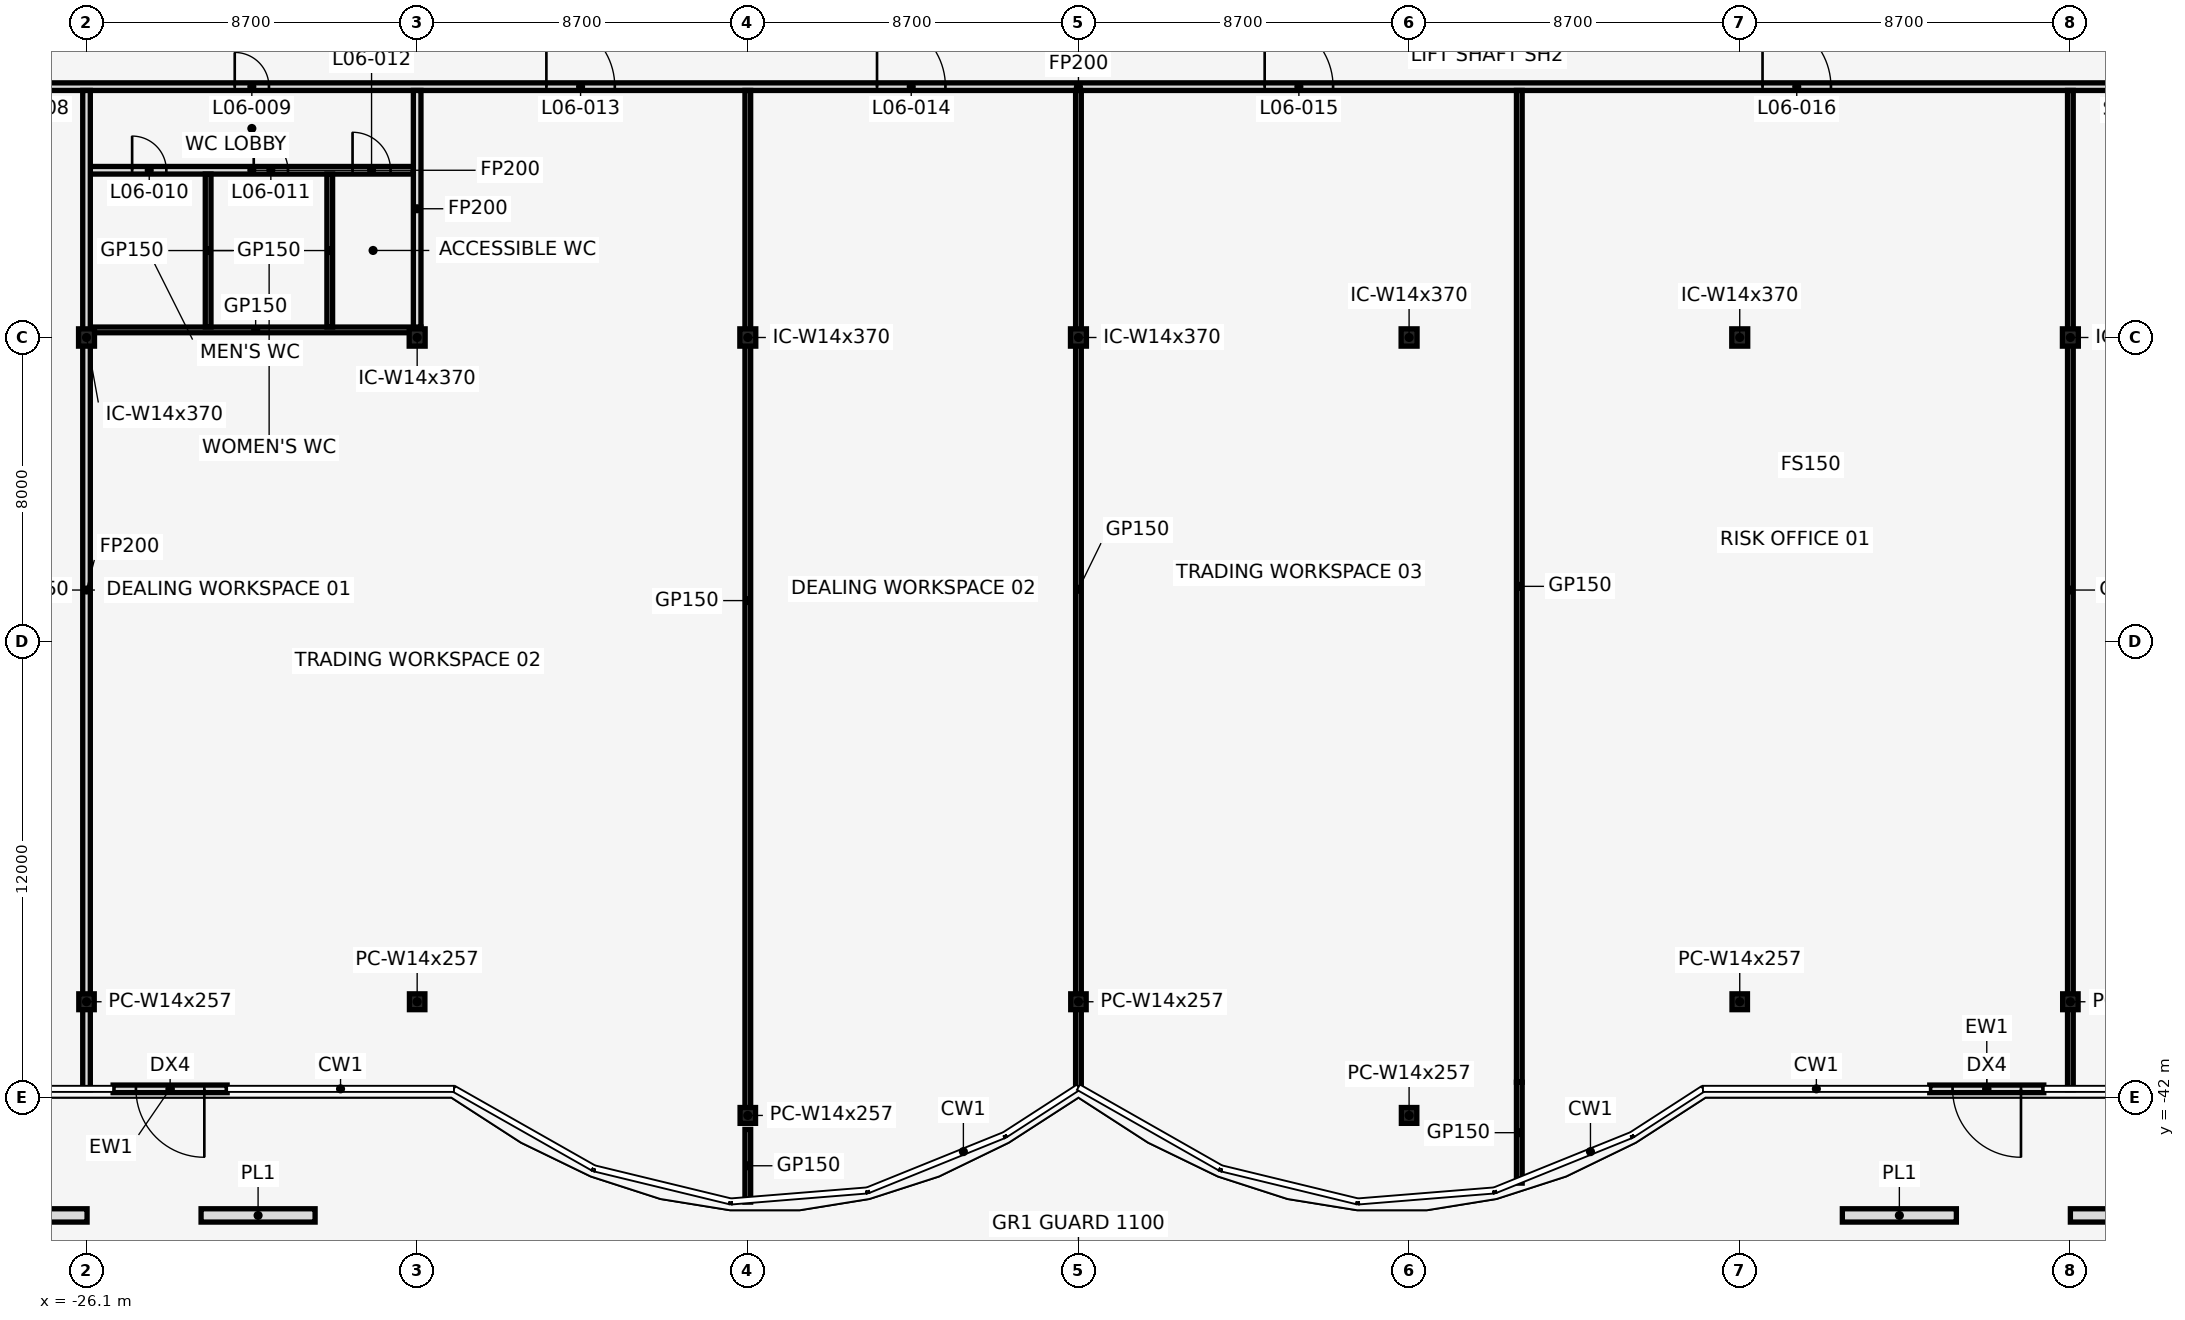
"""IFC4 building model, lengths in metres.
Left out: names, types, materials, properties, quantities, classifications, styles, units other than length and angle.
Written with IfcOpenShell. Run it as: python <this file> out.ifc"""

import sys

from ifc_helpers import new_model, si_unit, direction, frame, frame_2d, origin, origin_2d, place, context, subcontext, project, spatial, rectangle, i_section, extrude, element, fill, save


model = new_model("IFC4")
c1 = context("Model", 3, precision=1e-05, world=origin(), true_north=direction((0.0, 1.0)))
c2 = subcontext(c1, "Body", "Model", "MODEL_VIEW")
j1 = project(units=[si_unit("LENGTHUNIT", "METRE"), si_unit("PLANEANGLEUNIT", "RADIAN")], contexts=[c1])
p1 = place(None, origin())
s1 = spatial("IfcSite", under=j1, at=p1, CompositionType="ELEMENT")
p2 = place(p1, origin())
s2 = spatial("IfcBuilding", under=s1, at=p2, CompositionType="ELEMENT")
p3 = place(p2, frame((0.0, 0.0, 35.0)))
s3 = spatial("IfcBuildingStorey", under=s2, at=p3, CompositionType="ELEMENT", Elevation=35.0)
for number, where, z_axis, x_axis in (
    (1, (-26.1, -39.478, 0.0), (0.0, 0.0, 1.0), (1.0, 0.0, 0.0)),
    (2, (-17.4, -39.478, 0.0), (0.0, 0.0, 1.0), (1.0, 0.0, 0.0)),
    (3, (-8.7, -42.469, 0.0), (0.0, 0.0, 1.0), (1.0, 0.0, 0.0)),
    (4, (0.0, -39.478, 0.0), (0.0, 0.0, 1.0), (1.0, 0.0, 0.0)),
    (5, (8.7, -42.469, 0.0), (0.0, 0.0, 1.0), (1.0, 0.0, 0.0)),
    (6, (17.4, -39.478, 0.0), (0.0, 0.0, 1.0), (1.0, 0.0, 0.0)),
    (7, (26.1, -39.478, 0.0), (0.0, 0.0, 1.0), (1.0, 0.0, 0.0)),
):
    element("IfcColumn", number, at=place(p3, frame(where, z_axis=z_axis, x_axis=x_axis)), inside=s3, PredefinedType="COLUMN", context=c2, shape_type="SweptSolid", body=[
        extrude(i_section(OverallWidth=0.406, OverallDepth=0.417, WebThickness=0.03, FlangeThickness=0.048, at=origin_2d()), origin(), (0.0, 0.0, 1.0), 4.5),
    ])
for number, where, z_axis, x_axis in (
    (8, (-26.1, -22.0, 0.0), (0.0, 0.0, 1.0), (1.0, 0.0, 0.0)),
    (9, (-17.4, -22.0, 0.0), (0.0, 0.0, 1.0), (1.0, 0.0, 0.0)),
    (10, (-8.7, -22.0, 0.0), (0.0, 0.0, 1.0), (1.0, 0.0, 0.0)),
    (11, (0.0, -22.0, 0.0), (0.0, 0.0, 1.0), (1.0, 0.0, 0.0)),
    (12, (8.7, -22.0, 0.0), (0.0, 0.0, 1.0), (1.0, 0.0, 0.0)),
    (13, (17.4, -22.0, 0.0), (0.0, 0.0, 1.0), (1.0, 0.0, 0.0)),
    (14, (26.1, -22.0, 0.0), (0.0, 0.0, 1.0), (1.0, 0.0, 0.0)),
):
    element("IfcColumn", number, at=place(p3, frame(where, z_axis=z_axis, x_axis=x_axis)), inside=s3, PredefinedType="COLUMN", context=c2, shape_type="SweptSolid", body=[
        extrude(i_section(OverallWidth=0.419, OverallDepth=0.455, WebThickness=0.042, FlangeThickness=0.068, at=origin_2d()), origin(), (0.0, 0.0, 1.0), 4.5),
    ])
p4 = place(p3, frame((-22.4, -41.77, 0.0), z_axis=(0.0, 0.0, 1.0), x_axis=(-1.0, 0.0, 0.0)))
e15 = element("IfcWall", 15, at=p4, inside=s3, PredefinedType="STANDARD", context=c2, shape_type="SweptSolid", body=[
    extrude(rectangle(XDim=3.0, YDim=0.2, at=frame_2d((1.5, 0.0))), origin(), (0.0, 0.0, 1.0), 4.35),
])
p5 = place(p4, frame((0.6, 0.0, 0.0)))
e16 = element("IfcOpeningElement", 16, at=p5, cuts=e15, PredefinedType="OPENING", context=c2, shape_type="SweptSolid", body=[
    extrude(rectangle(XDim=1.8, YDim=2.4, at=frame_2d((0.9, 1.2))), frame((0.0, 0.112, 0.0), z_axis=(0.0, -1.0, 0.0), x_axis=(1.0, 0.0, 0.0)), (0.0, 0.0, 1.0), 0.224),
])
p6 = place(p3, frame((25.4, -41.77, 0.0), z_axis=(0.0, 0.0, 1.0), x_axis=(-1.0, 0.0, 0.0)))
e17 = element("IfcWall", 17, at=p6, inside=s3, PredefinedType="STANDARD", context=c2, shape_type="SweptSolid", body=[
    extrude(rectangle(XDim=3.0, YDim=0.2, at=frame_2d((1.5, 0.0))), origin(), (0.0, 0.0, 1.0), 4.35),
])
p7 = place(p6, frame((0.6, 0.0, 0.0)))
e18 = element("IfcOpeningElement", 18, at=p7, cuts=e17, PredefinedType="OPENING", context=c2, shape_type="SweptSolid", body=[
    extrude(rectangle(XDim=1.8, YDim=2.4, at=frame_2d((0.9, 1.2))), frame((0.0, 0.112, 0.0), z_axis=(0.0, -1.0, 0.0), x_axis=(1.0, 0.0, 0.0)), (0.0, 0.0, 1.0), 0.224),
])
for number, where, z_axis, x_axis in (
    (19, (-20.086, -45.1, 0.0), (0.0, 0.0, 1.0), (-1.0, 0.0, 0.0)),
    (20, (-26.086, -45.1, 0.0), (0.0, 0.0, 1.0), (-1.0, 0.0, 0.0)),
    (21, (29.1, -45.1, 0.0), (0.0, 0.0, 1.0), (-1.0, 0.0, 0.0)),
    (22, (23.1, -45.1, 0.0), (0.0, 0.0, 1.0), (-1.0, 0.0, 0.0)),
):
    element("IfcWall", number, at=place(p3, frame(where, z_axis=z_axis, x_axis=x_axis)), inside=s3, PredefinedType="USERDEFINED", context=c2, shape_type="SweptSolid", body=[
        extrude(rectangle(XDim=3.0, YDim=0.35, at=frame_2d((1.5, 0.0))), origin(), (0.0, 0.0, 1.0), 0.6),
    ])
p8 = place(p3, frame((-26.0, -21.8, 0.0), z_axis=(0.0, 0.0, 1.0), x_axis=(1.0, 0.0, 0.0)))
e23 = element("IfcWall", 23, at=p8, inside=s3, PredefinedType="PARTITIONING", context=c2, shape_type="SweptSolid", body=[
    extrude(rectangle(XDim=8.7, YDim=0.15, at=frame_2d((4.35, 0.0))), origin(), (0.0, 0.0, 1.0), 3.36),
])
p9 = place(p3, frame((-26.0, -17.6, 0.0), z_axis=(0.0, 0.0, 1.0), x_axis=(1.0, 0.0, 0.0)))
e24 = element("IfcWall", 24, at=p9, inside=s3, PredefinedType="PARTITIONING", context=c2, shape_type="SweptSolid", body=[
    extrude(rectangle(XDim=8.5, YDim=0.2, at=frame_2d((4.25, 0.0))), origin(), (0.0, 0.0, 1.0), 3.36),
])
p10 = place(p9, frame((1.1, 0.0, 0.0)))
e25 = element("IfcOpeningElement", 25, at=p10, cuts=e24, PredefinedType="OPENING", context=c2, shape_type="SweptSolid", body=[
    extrude(rectangle(XDim=0.9, YDim=2.1, at=frame_2d((0.45, 1.05))), frame((0.0, 0.112, 0.0), z_axis=(0.0, -1.0, 0.0), x_axis=(1.0, 0.0, 0.0)), (0.0, 0.0, 1.0), 0.224),
])
p11 = place(p9, frame((4.3, 0.0, 0.0)))
e26 = element("IfcOpeningElement", 26, at=p11, cuts=e24, PredefinedType="OPENING", context=c2, shape_type="SweptSolid", body=[
    extrude(rectangle(XDim=0.9, YDim=2.1, at=frame_2d((0.45, 1.05))), frame((0.0, 0.112, 0.0), z_axis=(0.0, -1.0, 0.0), x_axis=(1.0, 0.0, 0.0)), (0.0, 0.0, 1.0), 0.224),
])
p12 = place(p9, frame((6.9, 0.0, 0.0)))
e27 = element("IfcOpeningElement", 27, at=p12, cuts=e24, PredefinedType="OPENING", context=c2, shape_type="SweptSolid", body=[
    extrude(rectangle(XDim=1.0, YDim=2.1, at=frame_2d((0.5, 1.05))), frame((0.0, 0.112, 0.0), z_axis=(0.0, -1.0, 0.0), x_axis=(1.0, 0.0, 0.0)), (0.0, 0.0, 1.0), 0.224),
])
p13 = place(p3, frame((-35.68, -15.4, 0.0), z_axis=(0.0, 0.0, 1.0), x_axis=(1.0, 0.0, 0.0)))
e28 = element("IfcWall", 28, at=p13, inside=s3, PredefinedType="PARTITIONING", context=c2, shape_type="SweptSolid", body=[
    extrude(rectangle(XDim=71.36, YDim=0.2, at=frame_2d((35.68, 0.0))), origin(), (0.0, 0.0, 1.0), 3.36),
])
p14 = place(p13, frame((3.3, 0.0, 0.0)))
e29 = element("IfcOpeningElement", 29, at=p14, cuts=e28, PredefinedType="OPENING", context=c2, shape_type="SweptSolid", body=[
    extrude(rectangle(XDim=1.8, YDim=2.1, at=frame_2d((0.9, 1.05))), frame((0.0, 0.112, 0.0), z_axis=(0.0, -1.0, 0.0), x_axis=(1.0, 0.0, 0.0)), (0.0, 0.0, 1.0), 0.224),
])
p15 = place(p13, frame((7.58, 0.0, 0.0)))
e30 = element("IfcOpeningElement", 30, at=p15, cuts=e28, PredefinedType="OPENING", context=c2, shape_type="SweptSolid", body=[
    extrude(rectangle(XDim=1.0, YDim=2.1, at=frame_2d((0.5, 1.05))), frame((0.0, 0.112, 0.0), z_axis=(0.0, -1.0, 0.0), x_axis=(1.0, 0.0, 0.0)), (0.0, 0.0, 1.0), 0.224),
])
p16 = place(p13, frame((13.48, 0.0, 0.0)))
e31 = element("IfcOpeningElement", 31, at=p16, cuts=e28, PredefinedType="OPENING", context=c2, shape_type="SweptSolid", body=[
    extrude(rectangle(XDim=0.9, YDim=2.1, at=frame_2d((0.45, 1.05))), frame((0.0, 0.112, 0.0), z_axis=(0.0, -1.0, 0.0), x_axis=(1.0, 0.0, 0.0)), (0.0, 0.0, 1.0), 0.224),
])
p17 = place(p13, frame((21.68, 0.0, 0.0)))
e32 = element("IfcOpeningElement", 32, at=p17, cuts=e28, PredefinedType="OPENING", context=c2, shape_type="SweptSolid", body=[
    extrude(rectangle(XDim=1.8, YDim=2.1, at=frame_2d((0.9, 1.05))), frame((0.0, 0.112, 0.0), z_axis=(0.0, -1.0, 0.0), x_axis=(1.0, 0.0, 0.0)), (0.0, 0.0, 1.0), 0.224),
])
p18 = place(p13, frame((30.38, 0.0, 0.0)))
e33 = element("IfcOpeningElement", 33, at=p18, cuts=e28, PredefinedType="OPENING", context=c2, shape_type="SweptSolid", body=[
    extrude(rectangle(XDim=1.8, YDim=2.1, at=frame_2d((0.9, 1.05))), frame((0.0, 0.112, 0.0), z_axis=(0.0, -1.0, 0.0), x_axis=(1.0, 0.0, 0.0)), (0.0, 0.0, 1.0), 0.224),
])
p19 = place(p13, frame((40.58, 0.0, 0.0)))
e34 = element("IfcOpeningElement", 34, at=p19, cuts=e28, PredefinedType="OPENING", context=c2, shape_type="SweptSolid", body=[
    extrude(rectangle(XDim=1.8, YDim=2.1, at=frame_2d((0.9, 1.05))), frame((0.0, 0.112, 0.0), z_axis=(0.0, -1.0, 0.0), x_axis=(1.0, 0.0, 0.0)), (0.0, 0.0, 1.0), 0.224),
])
p20 = place(p13, frame((53.68, 0.0, 0.0)))
e35 = element("IfcOpeningElement", 35, at=p20, cuts=e28, PredefinedType="OPENING", context=c2, shape_type="SweptSolid", body=[
    extrude(rectangle(XDim=1.8, YDim=2.1, at=frame_2d((0.9, 1.05))), frame((0.0, 0.112, 0.0), z_axis=(0.0, -1.0, 0.0), x_axis=(1.0, 0.0, 0.0)), (0.0, 0.0, 1.0), 0.224),
])
p21 = place(p13, frame((65.68, 0.0, 0.0)))
e36 = element("IfcOpeningElement", 36, at=p21, cuts=e28, PredefinedType="OPENING", context=c2, shape_type="SweptSolid", body=[
    extrude(rectangle(XDim=1.8, YDim=2.1, at=frame_2d((0.9, 1.05))), frame((0.0, 0.112, 0.0), z_axis=(0.0, -1.0, 0.0), x_axis=(1.0, 0.0, 0.0)), (0.0, 0.0, 1.0), 0.224),
])
p22 = place(p3, frame((-26.1, -41.79, 0.0), z_axis=(0.0, 0.0, 1.0), x_axis=(0.0, 1.0, 0.0)))
e37 = element("IfcWall", 37, at=p22, inside=s3, PredefinedType="PARTITIONING", context=c2, shape_type="SweptSolid", body=[
    extrude(rectangle(XDim=26.29, YDim=0.2, at=frame_2d((13.145, 0.0))), origin(), (0.0, 0.0, 1.0), 3.36),
])
for number, where, z_axis, x_axis in (
    (38, (-22.9, -21.725, 0.0), (0.0, 0.0, 1.0), (0.0, 1.0, 0.0)),
    (39, (-19.7, -21.725, 0.0), (0.0, 0.0, 1.0), (0.0, 1.0, 0.0)),
):
    element("IfcWall", number, at=place(p3, frame(where, z_axis=z_axis, x_axis=x_axis)), inside=s3, PredefinedType="PARTITIONING", context=c2, shape_type="SweptSolid", body=[
        extrude(rectangle(XDim=4.025, YDim=0.15, at=frame_2d((2.013, 0.0))), origin(), (0.0, 0.0, 1.0), 3.36),
    ])
p23 = place(p3, frame((-17.4, -21.725, 0.0), z_axis=(0.0, 0.0, 1.0), x_axis=(0.0, 1.0, 0.0)))
e40 = element("IfcWall", 40, at=p23, inside=s3, PredefinedType="PARTITIONING", context=c2, shape_type="SweptSolid", body=[
    extrude(rectangle(XDim=6.225, YDim=0.2, at=frame_2d((3.113, 0.0))), origin(), (0.0, 0.0, 1.0), 3.36),
])
p24 = place(p3, frame((-8.7, -44.75, 0.0), z_axis=(0.0, 0.0, 1.0), x_axis=(0.0, 1.0, 0.0)))
e41 = element("IfcWall", 41, at=p24, inside=s3, PredefinedType="PARTITIONING", context=c2, shape_type="SweptSolid", body=[
    extrude(rectangle(XDim=1.913, YDim=0.15, at=frame_2d((0.957, 0.0))), origin(), (0.0, 0.0, 1.0), 3.36),
])
p25 = place(p3, frame((-8.7, -42.345, 0.0), z_axis=(0.0, 0.0, 1.0), x_axis=(0.0, 1.0, 0.0)))
e42 = element("IfcWall", 42, at=p25, inside=s3, PredefinedType="PARTITIONING", context=c2, shape_type="SweptSolid", body=[
    extrude(rectangle(XDim=26.845, YDim=0.15, at=frame_2d((13.423, 0.0))), origin(), (0.0, 0.0, 1.0), 3.36),
])
p26 = place(p3, frame((0.0, -41.75, 0.0), z_axis=(0.0, 0.0, 1.0), x_axis=(0.0, 1.0, 0.0)))
e43 = element("IfcWall", 43, at=p26, inside=s3, PredefinedType="PARTITIONING", context=c2, shape_type="SweptSolid", body=[
    extrude(rectangle(XDim=26.25, YDim=0.15, at=frame_2d((13.125, 0.0))), origin(), (0.0, 0.0, 1.0), 3.36),
])
p27 = place(p3, frame((11.6, -44.25, 0.0), z_axis=(0.0, 0.0, 1.0), x_axis=(0.0, 1.0, 0.0)))
e44 = element("IfcWall", 44, at=p27, inside=s3, PredefinedType="PARTITIONING", context=c2, shape_type="SweptSolid", body=[
    extrude(rectangle(XDim=2.654, YDim=0.15, at=frame_2d((1.327, 0.0))), origin(), (0.0, 0.0, 1.0), 3.36),
])
p28 = place(p3, frame((11.6, -41.596, 0.0), z_axis=(0.0, 0.0, 1.0), x_axis=(0.0, 1.0, 0.0)))
e45 = element("IfcWall", 45, at=p28, inside=s3, PredefinedType="PARTITIONING", context=c2, shape_type="SweptSolid", body=[
    extrude(rectangle(XDim=26.096, YDim=0.15, at=frame_2d((13.048, 0.0))), origin(), (0.0, 0.0, 1.0), 3.36),
])
p29 = place(p3, frame((26.1, -41.79, 0.0), z_axis=(0.0, 0.0, 1.0), x_axis=(0.0, 1.0, 0.0)))
e46 = element("IfcWall", 46, at=p29, inside=s3, PredefinedType="PARTITIONING", context=c2, shape_type="SweptSolid", body=[
    extrude(rectangle(XDim=26.29, YDim=0.15, at=frame_2d((13.145, 0.0))), origin(), (0.0, 0.0, 1.0), 3.36),
])
p30 = place(p5, origin())
e47 = element("IfcDoor", 47, at=p30, inside=s3, OperationType="SINGLE_SWING_LEFT", PredefinedType="DOOR", context=c2, shape_type="SweptSolid", body=[
    extrude(rectangle(XDim=1.8, YDim=2.4, at=frame_2d((0.9, 1.2))), frame((0.0, 0.025, 0.0), z_axis=(0.0, -1.0, 0.0), x_axis=(1.0, 0.0, 0.0)), (0.0, 0.0, 1.0), 0.05),
])
fill(e16, e47)
p31 = place(p7, origin())
e48 = element("IfcDoor", 48, at=p31, inside=s3, OperationType="SINGLE_SWING_LEFT", PredefinedType="DOOR", context=c2, shape_type="SweptSolid", body=[
    extrude(rectangle(XDim=1.8, YDim=2.4, at=frame_2d((0.9, 1.2))), frame((0.0, 0.025, 0.0), z_axis=(0.0, -1.0, 0.0), x_axis=(1.0, 0.0, 0.0)), (0.0, 0.0, 1.0), 0.05),
])
fill(e18, e48)
p32 = place(p16, frame((0.9, 0.0, 0.0), z_axis=(0.0, 0.0, 1.0), x_axis=(-1.0, 0.0, 0.0)))
e49 = element("IfcDoor", 49, at=p32, inside=s3, OperationType="SINGLE_SWING_RIGHT", PredefinedType="DOOR", context=c2, shape_type="SweptSolid", body=[
    extrude(rectangle(XDim=0.9, YDim=2.1, at=frame_2d((0.45, 1.05))), frame((0.0, 0.025, 0.0), z_axis=(0.0, -1.0, 0.0), x_axis=(1.0, 0.0, 0.0)), (0.0, 0.0, 1.0), 0.05),
])
fill(e31, e49)
p33 = place(p10, frame((0.9, 0.0, 0.0), z_axis=(0.0, 0.0, 1.0), x_axis=(-1.0, 0.0, 0.0)))
e50 = element("IfcDoor", 50, at=p33, inside=s3, OperationType="SINGLE_SWING_LEFT", PredefinedType="DOOR", context=c2, shape_type="SweptSolid", body=[
    extrude(rectangle(XDim=0.9, YDim=2.1, at=frame_2d((0.45, 1.05))), frame((0.0, 0.025, 0.0), z_axis=(0.0, -1.0, 0.0), x_axis=(1.0, 0.0, 0.0)), (0.0, 0.0, 1.0), 0.05),
])
fill(e25, e50)
p34 = place(p11, frame((0.9, 0.0, 0.0), z_axis=(0.0, 0.0, 1.0), x_axis=(-1.0, 0.0, 0.0)))
e51 = element("IfcDoor", 51, at=p34, inside=s3, OperationType="SINGLE_SWING_RIGHT", PredefinedType="DOOR", context=c2, shape_type="SweptSolid", body=[
    extrude(rectangle(XDim=0.9, YDim=2.1, at=frame_2d((0.45, 1.05))), frame((0.0, 0.025, 0.0), z_axis=(0.0, -1.0, 0.0), x_axis=(1.0, 0.0, 0.0)), (0.0, 0.0, 1.0), 0.05),
])
fill(e26, e51)
p35 = place(p12, frame((1.0, 0.0, 0.0), z_axis=(0.0, 0.0, 1.0), x_axis=(-1.0, 0.0, 0.0)))
e52 = element("IfcDoor", 52, at=p35, inside=s3, OperationType="SINGLE_SWING_RIGHT", PredefinedType="DOOR", context=c2, shape_type="SweptSolid", body=[
    extrude(rectangle(XDim=1.0, YDim=2.1, at=frame_2d((0.5, 1.05))), frame((0.0, 0.025, 0.0), z_axis=(0.0, -1.0, 0.0), x_axis=(1.0, 0.0, 0.0)), (0.0, 0.0, 1.0), 0.05),
])
fill(e27, e52)
p36 = place(p17, origin())
e53 = element("IfcDoor", 53, at=p36, inside=s3, OperationType="SINGLE_SWING_LEFT", PredefinedType="DOOR", context=c2, shape_type="SweptSolid", body=[
    extrude(rectangle(XDim=1.8, YDim=2.1, at=frame_2d((0.9, 1.05))), frame((0.0, 0.025, 0.0), z_axis=(0.0, -1.0, 0.0), x_axis=(1.0, 0.0, 0.0)), (0.0, 0.0, 1.0), 0.05),
])
fill(e32, e53)
p37 = place(p18, origin())
e54 = element("IfcDoor", 54, at=p37, inside=s3, OperationType="SINGLE_SWING_LEFT", PredefinedType="DOOR", context=c2, shape_type="SweptSolid", body=[
    extrude(rectangle(XDim=1.8, YDim=2.1, at=frame_2d((0.9, 1.05))), frame((0.0, 0.025, 0.0), z_axis=(0.0, -1.0, 0.0), x_axis=(1.0, 0.0, 0.0)), (0.0, 0.0, 1.0), 0.05),
])
fill(e33, e54)
p38 = place(p19, origin())
e55 = element("IfcDoor", 55, at=p38, inside=s3, OperationType="SINGLE_SWING_LEFT", PredefinedType="DOOR", context=c2, shape_type="SweptSolid", body=[
    extrude(rectangle(XDim=1.8, YDim=2.1, at=frame_2d((0.9, 1.05))), frame((0.0, 0.025, 0.0), z_axis=(0.0, -1.0, 0.0), x_axis=(1.0, 0.0, 0.0)), (0.0, 0.0, 1.0), 0.05),
])
fill(e34, e55)
p39 = place(p20, origin())
e56 = element("IfcDoor", 56, at=p39, inside=s3, OperationType="SINGLE_SWING_LEFT", PredefinedType="DOOR", context=c2, shape_type="SweptSolid", body=[
    extrude(rectangle(XDim=1.8, YDim=2.1, at=frame_2d((0.9, 1.05))), frame((0.0, 0.025, 0.0), z_axis=(0.0, -1.0, 0.0), x_axis=(1.0, 0.0, 0.0)), (0.0, 0.0, 1.0), 0.05),
])
fill(e35, e56)
save(model, sys.argv[1])
